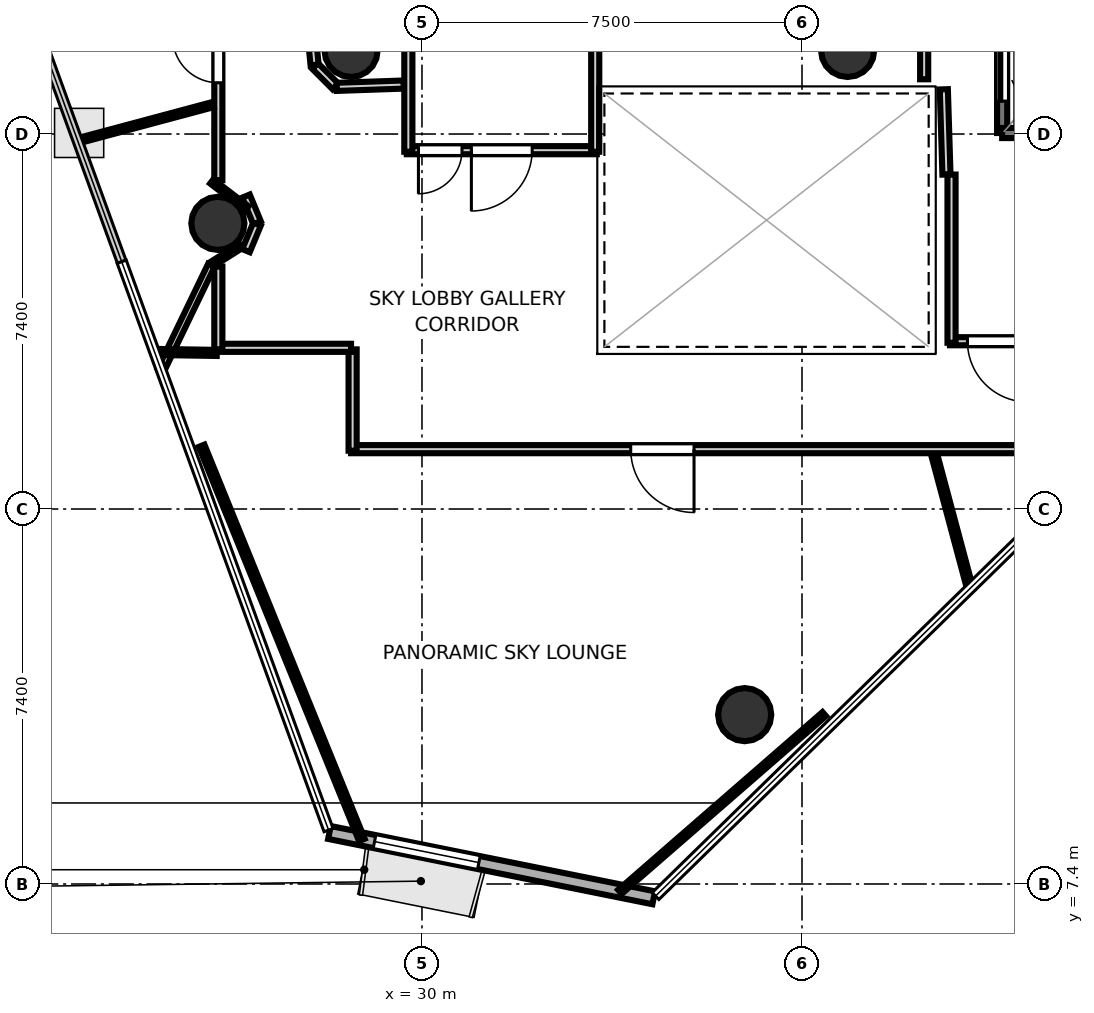
"""IFC4 building model, lengths in metres.
Left out: names, types, materials, properties, quantities, classifications, styles, units other than length and angle.
Written with IfcOpenShell. Run it as: python <this file> out.ifc"""

import sys

from ifc_helpers import new_model, si_unit, direction, frame, frame_2d, origin, origin_2d, place, context, subcontext, project, spatial, rectangle, hollow_circle, extrude, element, fill, save


model = new_model("IFC4")
c1 = context("Model", 3, precision=1e-05, world=origin(), true_north=direction((0.0, 1.0)))
c2 = subcontext(c1, "Body", "Model", "MODEL_VIEW")
j1 = project(units=[si_unit("LENGTHUNIT", "METRE"), si_unit("PLANEANGLEUNIT", "RADIAN")], contexts=[c1])
p1 = place(None, origin())
s1 = spatial("IfcSite", under=j1, at=p1, CompositionType="ELEMENT")
p2 = place(p1, origin())
s2 = spatial("IfcBuilding", under=s1, at=p2, CompositionType="ELEMENT")
p3 = place(p2, frame((0.0, 0.0, 234.5)))
s3 = spatial("IfcBuildingStorey", under=s2, at=p3, CompositionType="ELEMENT", Elevation=234.5)
for number, where, z_axis, x_axis in (
    (1, (28.6, 23.85, 0.0), (0.0, 0.0, 1.0), (1.0, 0.0, 0.0)),
    (2, (38.4, 23.85, 0.0), (0.0, 0.0, 1.0), (1.0, 0.0, 0.0)),
):
    element("IfcColumn", number, at=place(p3, frame(where, z_axis=z_axis, x_axis=x_axis)), inside=s3, PredefinedType="COLUMN", context=c2, shape_type="SweptSolid", body=[
        extrude(hollow_circle(Radius=0.525, WallThickness=0.028, at=origin_2d()), origin(), (0.0, 0.0, 1.0), 4.5),
    ])
for number, where, z_axis, x_axis in (
    (3, (25.972, 20.437, -0.27), (0.0, 0.0, 1.0), (1.0, 0.0, 0.0)),
    (4, (36.369, 10.742, -0.27), (0.0, 0.0, 1.0), (1.0, 0.0, 0.0)),
):
    element("IfcColumn", number, at=place(p3, frame(where, z_axis=z_axis, x_axis=x_axis)), inside=s3, PredefinedType="COLUMN", context=c2, shape_type="SweptSolid", body=[
        extrude(hollow_circle(Radius=0.525, WallThickness=0.028, at=origin_2d()), origin(), (0.0, 0.0, 1.0), 4.77),
    ])
p4 = place(p3, frame((28.173, 8.417, 0.0), z_axis=(0.0, 0.0, 1.0), x_axis=(0.980315150118, -0.197439120866, 0.0)))
e5 = element("IfcWall", 5, at=p4, inside=s3, PredefinedType="SOLIDWALL", context=c2, shape_type="SweptSolid", body=[
    extrude(rectangle(XDim=6.529, YDim=0.26, at=frame_2d((3.264, 0.0))), origin(), (0.0, 0.0, 1.0), 4.32),
])
p5 = place(p4, frame((0.909, 0.0, 0.85)))
e6 = element("IfcOpeningElement", 6, at=p5, cuts=e5, PredefinedType="OPENING", context=c2, shape_type="SweptSolid", body=[
    extrude(rectangle(XDim=2.1, YDim=2.2, at=frame_2d((1.05, 1.1))), frame((0.0, 0.14, 0.0), z_axis=(0.0, -1.0, 0.0), x_axis=(1.0, 0.0, 0.0)), (0.0, 0.0, 1.0), 0.28),
])
p6 = place(p3, frame((41.45, 22.22, 0.0), z_axis=(0.0, 0.0, 1.0), x_axis=(0.0, 1.0, 0.0)))
e7 = element("IfcWall", 7, at=p6, inside=s3, PredefinedType="SOLIDWALL", context=c2, shape_type="SweptSolid", body=[
    extrude(rectangle(XDim=2.36, YDim=0.2, at=frame_2d((1.18, 0.0))), origin(), (0.0, 0.0, 1.0), 4.32),
])
p7 = place(p6, frame((0.63, 0.0, 0.0)))
e8 = element("IfcOpeningElement", 8, at=p7, cuts=e7, PredefinedType="OPENING", context=c2, shape_type="SweptSolid", body=[
    extrude(rectangle(XDim=1.1, YDim=2.15, at=frame_2d((0.55, 1.075))), frame((0.0, 0.11, 0.0), z_axis=(0.0, -1.0, 0.0), x_axis=(1.0, 0.0, 0.0)), (0.0, 0.0, 1.0), 0.22),
])
p8 = place(p3, frame((41.45, 22.22, 0.0), z_axis=(0.0, 0.0, 1.0), x_axis=(1.0, 0.0, 0.0)))
e9 = element("IfcWall", 9, at=p8, inside=s3, PredefinedType="SOLIDWALL", context=c2, shape_type="SweptSolid", body=[
    extrude(rectangle(XDim=2.1, YDim=0.2, at=frame_2d((1.05, 0.0))), origin(), (0.0, 0.0, 1.0), 4.32),
])
p9 = place(p3, frame((33.45, 21.881, 0.0), z_axis=(0.0, 0.0, 1.0), x_axis=(-1.0, 0.0, 0.0)))
e10 = element("IfcWall", 10, at=p9, inside=s3, PredefinedType="PARTITIONING", context=c2, shape_type="SweptSolid", body=[
    extrude(rectangle(XDim=3.75, YDim=0.16, at=frame_2d((1.875, 0.0))), origin(), (0.0, 0.0, 1.0), 3.64),
])
p10 = place(p9, frame((1.275, 0.0, 0.0)))
e11 = element("IfcOpeningElement", 11, at=p10, cuts=e10, PredefinedType="OPENING", context=c2, shape_type="SweptSolid", body=[
    extrude(rectangle(XDim=1.2, YDim=2.15, at=frame_2d((0.6, 1.075))), frame((0.0, 0.09, 0.0), z_axis=(0.0, -1.0, 0.0), x_axis=(1.0, 0.0, 0.0)), (0.0, 0.0, 1.0), 0.18),
])
p11 = place(p9, frame((2.66, 0.0, 0.0)))
e12 = element("IfcOpeningElement", 12, at=p11, cuts=e10, PredefinedType="OPENING", context=c2, shape_type="SweptSolid", body=[
    extrude(rectangle(XDim=0.86, YDim=2.05, at=frame_2d((0.43, 1.025))), frame((0.0, 0.09, 0.0), z_axis=(0.0, -1.0, 0.0), x_axis=(1.0, 0.0, 0.0)), (0.0, 0.0, 1.0), 0.18),
])
for number, where, z_axis, x_axis in (
    (13, (29.731, 21.85, 0.0), (0.0, 0.0, 1.0), (0.0, 1.0, 0.0)),
    (14, (33.419, 24.542, 0.0), (0.0, 0.0, 1.0), (0.0, -1.0, 0.0)),
):
    element("IfcWall", number, at=place(p3, frame(where, z_axis=z_axis, x_axis=x_axis)), inside=s3, PredefinedType="PARTITIONING", context=c2, shape_type="SweptSolid", body=[
        extrude(rectangle(XDim=2.692, YDim=0.16, at=frame_2d((1.346, 0.0))), origin(), (0.0, 0.0, 1.0), 3.64),
    ])
p12 = place(p3, frame((40.351, 21.401, 0.0), z_axis=(0.0, 0.0, 1.0), x_axis=(-0.031058045979, 0.999517582527, 0.0)))
e15 = element("IfcWall", 15, at=p12, inside=s3, PredefinedType="PARTITIONING", context=c2, shape_type="SweptSolid", body=[
    extrude(rectangle(XDim=1.682, YDim=0.16, at=frame_2d((0.841, 0.0))), origin(), (0.0, 0.0, 1.0), 3.64),
])
p13 = place(p3, frame((39.911, 23.28, 0.0), z_axis=(0.0, 0.0, 1.0), x_axis=(0.0, 1.0, 0.0)))
e16 = element("IfcWall", 16, at=p13, inside=s3, PredefinedType="PARTITIONING", context=c2, shape_type="SweptSolid", body=[
    extrude(rectangle(XDim=1.48, YDim=0.16, at=frame_2d((0.74, 0.0))), origin(), (0.0, 0.0, 1.0), 3.64),
])
p14 = place(p3, frame((43.15, 18.111, 0.0), z_axis=(0.0, 0.0, 1.0), x_axis=(-1.0, 0.0, 0.0)))
e17 = element("IfcWall", 17, at=p14, inside=s3, PredefinedType="PARTITIONING", context=c2, shape_type="SweptSolid", body=[
    extrude(rectangle(XDim=2.73, YDim=0.16, at=frame_2d((1.365, 0.0))), origin(), (0.0, 0.0, 1.0), 3.64),
])
p15 = place(p14, frame((1.185, 0.0, 0.0)))
e18 = element("IfcOpeningElement", 18, at=p15, cuts=e17, PredefinedType="OPENING", context=c2, shape_type="SweptSolid", body=[
    extrude(rectangle(XDim=1.2, YDim=2.15, at=frame_2d((0.6, 1.075))), frame((0.0, 0.09, 0.0), z_axis=(0.0, -1.0, 0.0), x_axis=(1.0, 0.0, 0.0)), (0.0, 0.0, 1.0), 0.18),
])
p16 = place(p3, frame((40.451, 18.08, 0.0), z_axis=(0.0, 0.0, 1.0), x_axis=(0.0, 1.0, 0.0)))
e19 = element("IfcWall", 19, at=p16, inside=s3, PredefinedType="PARTITIONING", context=c2, shape_type="SweptSolid", body=[
    extrude(rectangle(XDim=3.32, YDim=0.16, at=frame_2d((1.66, 0.0))), origin(), (0.0, 0.0, 1.0), 3.64),
])
p17 = place(p3, frame((27.838, 23.992, 0.0), z_axis=(0.0, 0.0, 1.0), x_axis=(0.098273407977, -0.995159453196, 0.0)))
e20 = element("IfcWall", 20, at=p17, inside=s3, PredefinedType="PARTITIONING", context=c2, shape_type="SweptSolid", body=[
    extrude(rectangle(XDim=0.432, YDim=0.16, at=frame_2d((0.216, 0.0))), origin(), (0.0, 0.0, 1.0), 3.64),
])
p18 = place(p3, frame((27.89, 23.543, 0.0), z_axis=(0.0, 0.0, 1.0), x_axis=(0.707106781187, -0.707106781187, 0.0)))
e21 = element("IfcWall", 21, at=p18, inside=s3, PredefinedType="PARTITIONING", context=c2, shape_type="SweptSolid", body=[
    extrude(rectangle(XDim=0.57, YDim=0.16, at=frame_2d((0.285, 0.0))), origin(), (0.0, 0.0, 1.0), 3.64),
])
p19 = place(p3, frame((28.316, 23.131, 0.0), z_axis=(0.0, 0.0, 1.0), x_axis=(0.999405342193, 0.034481328227, 0.0)))
e22 = element("IfcWall", 22, at=p19, inside=s3, PredefinedType="PARTITIONING", context=c2, shape_type="SweptSolid", body=[
    extrude(rectangle(XDim=1.324, YDim=0.16, at=frame_2d((0.662, 0.0))), origin(), (0.0, 0.0, 1.0), 3.64),
])
p20 = place(p3, frame((43.65, 15.981, 0.0), z_axis=(0.0, 0.0, 1.0), x_axis=(-1.0, 0.0, 0.0)))
e23 = element("IfcWall", 23, at=p20, inside=s3, PredefinedType="PARTITIONING", context=c2, shape_type="SweptSolid", body=[
    extrude(rectangle(XDim=15.05, YDim=0.16, at=frame_2d((7.525, 0.0))), origin(), (0.0, 0.0, 1.0), 3.64),
])
p21 = place(p20, frame((8.28, 0.0, 0.0)))
e24 = element("IfcOpeningElement", 24, at=p21, cuts=e23, PredefinedType="OPENING", context=c2, shape_type="SweptSolid", body=[
    extrude(rectangle(XDim=1.25, YDim=2.2, at=frame_2d((0.625, 1.1))), frame((0.0, 0.09, 0.0), z_axis=(0.0, -1.0, 0.0), x_axis=(1.0, 0.0, 0.0)), (0.0, 0.0, 1.0), 0.18),
])
p22 = place(p3, frame((28.631, 15.95, 0.0), z_axis=(0.0, 0.0, 1.0), x_axis=(0.0, 1.0, 0.0)))
e25 = element("IfcWall", 25, at=p22, inside=s3, PredefinedType="PARTITIONING", context=c2, shape_type="SweptSolid", body=[
    extrude(rectangle(XDim=2.0, YDim=0.16, at=frame_2d((1.0, 0.0))), origin(), (0.0, 0.0, 1.0), 3.64),
])
p23 = place(p3, frame((28.6, 17.981, 0.0), z_axis=(0.0, 0.0, 1.0), x_axis=(-1.0, 0.0, 0.0)))
e26 = element("IfcWall", 26, at=p23, inside=s3, PredefinedType="PARTITIONING", context=c2, shape_type="SweptSolid", body=[
    extrude(rectangle(XDim=2.65, YDim=0.16, at=frame_2d((1.325, 0.0))), origin(), (0.0, 0.0, 1.0), 3.64),
])
p24 = place(p3, frame((25.981, 17.95, 0.0), z_axis=(0.0, 0.0, 1.0), x_axis=(0.0, 1.0, 0.0)))
e27 = element("IfcWall", 27, at=p24, inside=s3, PredefinedType="PARTITIONING", context=c2, shape_type="SweptSolid", body=[
    extrude(rectangle(XDim=1.635, YDim=0.16, at=frame_2d((0.817, 0.0))), origin(), (0.0, 0.0, 1.0), 3.64),
])
p25 = place(p3, frame((26.527, 19.898, 0.0), z_axis=(0.0, 0.0, 1.0), x_axis=(0.382729887879, 0.923860288639, 0.0)))
e28 = element("IfcWall", 28, at=p25, inside=s3, PredefinedType="PARTITIONING", context=c2, shape_type="SweptSolid", body=[
    extrude(rectangle(XDim=0.57, YDim=0.16, at=frame_2d((0.285, 0.0))), origin(), (0.0, 0.0, 1.0), 3.64),
])
p26 = place(p3, frame((26.746, 20.449, 0.0), z_axis=(0.0, 0.0, 1.0), x_axis=(-0.382881317414, 0.923797541009, 0.0)))
e29 = element("IfcWall", 29, at=p26, inside=s3, PredefinedType="PARTITIONING", context=c2, shape_type="SweptSolid", body=[
    extrude(rectangle(XDim=0.57, YDim=0.16, at=frame_2d((0.285, 0.0))), origin(), (0.0, 0.0, 1.0), 3.64),
])
p27 = place(p3, frame((25.981, 21.289, 0.0), z_axis=(0.0, 0.0, 1.0), x_axis=(0.0, 1.0, 0.0)))
e30 = element("IfcWall", 30, at=p27, inside=s3, PredefinedType="PARTITIONING", context=c2, shape_type="SweptSolid", body=[
    extrude(rectangle(XDim=3.824, YDim=0.16, at=frame_2d((1.912, 0.0))), origin(), (0.0, 0.0, 1.0), 3.64),
])
p28 = place(p27, frame((1.922, 0.0, 0.0)))
e31 = element("IfcOpeningElement", 31, at=p28, cuts=e30, PredefinedType="OPENING", context=c2, shape_type="SweptSolid", body=[
    extrude(rectangle(XDim=0.9, YDim=2.1, at=frame_2d((0.45, 1.05))), frame((0.0, 0.09, 0.0), z_axis=(0.0, -1.0, 0.0), x_axis=(1.0, 0.0, 0.0)), (0.0, 0.0, 1.0), 0.18),
])
p29 = place(p3, frame((25.851, 21.265, 0.0), z_axis=(0.0, 0.0, 1.0), x_axis=(0.793898208532, -0.608050684145, 0.0)))
e32 = element("IfcWall", 32, at=p29, inside=s3, PredefinedType="PARTITIONING", context=c2, shape_type="SweptSolid", body=[
    extrude(rectangle(XDim=0.875, YDim=0.105, at=frame_2d((0.438, 0.0))), origin(), (0.0, 0.0, 1.0), 3.64),
])
p30 = place(p3, frame((26.422, 19.991, 0.0), z_axis=(0.0, 0.0, 1.0), x_axis=(-0.84577514661, -0.533539503108, 0.0)))
e33 = element("IfcWall", 33, at=p30, inside=s3, PredefinedType="PARTITIONING", context=c2, shape_type="SweptSolid", body=[
    extrude(rectangle(XDim=0.668, YDim=0.105, at=frame_2d((0.334, 0.0))), origin(), (0.0, 0.0, 1.0), 3.64),
])
p31 = place(p3, frame((25.842, 19.608, 0.0), z_axis=(0.0, 0.0, 1.0), x_axis=(-0.434265140705, -0.900785095108, 0.0)))
e34 = element("IfcWall", 34, at=p31, inside=s3, PredefinedType="PARTITIONING", context=c2, shape_type="SweptSolid", body=[
    extrude(rectangle(XDim=2.286, YDim=0.14, at=frame_2d((1.143, 0.0))), origin(), (0.0, 0.0, 1.0), 3.64),
])
p32 = place(p3, frame((24.702, 17.9, 0.0), z_axis=(0.0, 0.0, 1.0), x_axis=(0.999871423276, -0.016035489284, 0.0)))
e35 = element("IfcWall", 35, at=p32, inside=s3, PredefinedType="PARTITIONING", context=c2, shape_type="SweptSolid", body=[
    extrude(rectangle(XDim=1.249, YDim=0.12, at=frame_2d((0.624, 0.0))), origin(), (0.0, 0.0, 1.0), 3.64),
])
p33 = place(p3, frame((40.112, 15.862, 0.0), z_axis=(0.0, 0.0, 1.0), x_axis=(0.258853210166, -0.96591667114, 0.0)))
e36 = element("IfcWall", 36, at=p33, inside=s3, PredefinedType="PARTITIONING", context=c2, shape_type="SweptSolid", body=[
    extrude(rectangle(XDim=2.744, YDim=0.12, at=frame_2d((1.372, 0.0))), origin(), (0.0, 0.0, 1.0), 3.64),
])
p34 = place(p3, frame((37.939, 10.753, 0.0), z_axis=(0.0, 0.0, 1.0), x_axis=(-0.754503242289, -0.656296318271, 0.0)))
e37 = element("IfcWall", 37, at=p34, inside=s3, PredefinedType="PARTITIONING", context=c2, shape_type="SweptSolid", body=[
    extrude(rectangle(XDim=5.345, YDim=0.105, at=frame_2d((2.672, 0.0))), origin(), (0.0, 0.0, 1.0), 3.64),
])
p35 = place(p3, frame((28.813, 8.27, 0.0), z_axis=(0.0, 0.0, 1.0), x_axis=(-0.376573581052, 0.926386710858, 0.0)))
e38 = element("IfcWall", 38, at=p35, inside=s3, PredefinedType="PARTITIONING", context=c2, shape_type="SweptSolid", body=[
    extrude(rectangle(XDim=8.396, YDim=0.12, at=frame_2d((4.198, 0.0))), origin(), (0.0, 0.0, 1.0), 3.64),
])
p36 = place(p3, frame((23.186, 22.06, 0.0), z_axis=(0.0, 0.0, 1.0), x_axis=(0.965928889301, 0.258807613514, 0.0)))
e39 = element("IfcWall", 39, at=p36, inside=s3, PredefinedType="PARTITIONING", context=c2, shape_type="SweptSolid", body=[
    extrude(rectangle(XDim=2.787, YDim=0.105, at=frame_2d((1.393, 0.0))), origin(), (0.0, 0.0, 1.0), 3.64),
])
p37 = place(p7, origin())
e40 = element("IfcDoor", 40, at=p37, inside=s3, OperationType="SLIDING_TO_LEFT", PredefinedType="DOOR", context=c2, shape_type="SweptSolid", body=[
    extrude(rectangle(XDim=1.1, YDim=2.15, at=frame_2d((0.55, 1.075))), frame((0.0, 0.025, 0.0), z_axis=(0.0, -1.0, 0.0), x_axis=(1.0, 0.0, 0.0)), (0.0, 0.0, 1.0), 0.05),
])
fill(e8, e40)
p38 = place(p10, origin())
e41 = element("IfcDoor", 41, at=p38, inside=s3, OperationType="SINGLE_SWING_RIGHT", PredefinedType="DOOR", context=c2, shape_type="SweptSolid", body=[
    extrude(rectangle(XDim=1.2, YDim=2.15, at=frame_2d((0.6, 1.075))), frame((0.0, 0.025, 0.0), z_axis=(0.0, -1.0, 0.0), x_axis=(1.0, 0.0, 0.0)), (0.0, 0.0, 1.0), 0.05),
])
fill(e11, e41)
p39 = place(p15, origin())
e42 = element("IfcDoor", 42, at=p39, inside=s3, OperationType="SINGLE_SWING_LEFT", PredefinedType="DOOR", context=c2, shape_type="SweptSolid", body=[
    extrude(rectangle(XDim=1.2, YDim=2.15, at=frame_2d((0.6, 1.075))), frame((0.0, 0.025, 0.0), z_axis=(0.0, -1.0, 0.0), x_axis=(1.0, 0.0, 0.0)), (0.0, 0.0, 1.0), 0.05),
])
fill(e18, e42)
p40 = place(p11, origin())
e43 = element("IfcDoor", 43, at=p40, inside=s3, OperationType="SINGLE_SWING_RIGHT", PredefinedType="DOOR", context=c2, shape_type="SweptSolid", body=[
    extrude(rectangle(XDim=0.86, YDim=2.05, at=frame_2d((0.43, 1.025))), frame((0.0, 0.025, 0.0), z_axis=(0.0, -1.0, 0.0), x_axis=(1.0, 0.0, 0.0)), (0.0, 0.0, 1.0), 0.05),
])
fill(e12, e43)
p41 = place(p21, origin())
e44 = element("IfcDoor", 44, at=p41, inside=s3, OperationType="SINGLE_SWING_LEFT", PredefinedType="DOOR", context=c2, shape_type="SweptSolid", body=[
    extrude(rectangle(XDim=1.25, YDim=2.2, at=frame_2d((0.625, 1.1))), frame((0.0, 0.025, 0.0), z_axis=(0.0, -1.0, 0.0), x_axis=(1.0, 0.0, 0.0)), (0.0, 0.0, 1.0), 0.05),
])
fill(e24, e44)
p42 = place(p28, origin())
e45 = element("IfcDoor", 45, at=p42, inside=s3, OperationType="SINGLE_SWING_RIGHT", PredefinedType="DOOR", context=c2, shape_type="SweptSolid", body=[
    extrude(rectangle(XDim=0.9, YDim=2.1, at=frame_2d((0.45, 1.05))), frame((0.0, 0.025, 0.0), z_axis=(0.0, -1.0, 0.0), x_axis=(1.0, 0.0, 0.0)), (0.0, 0.0, 1.0), 0.05),
])
fill(e31, e45)
p43 = place(p5, origin())
e46 = element("IfcWindow", 46, at=p43, inside=s3, PartitioningType="SINGLE_PANEL", PredefinedType="WINDOW", context=c2, shape_type="SweptSolid", body=[
    extrude(rectangle(XDim=2.1, YDim=2.2, at=frame_2d((1.05, 1.1))), frame((0.0, 0.03, 0.0), z_axis=(0.0, -1.0, 0.0), x_axis=(1.0, 0.0, 0.0)), (0.0, 0.0, 1.0), 0.06),
])
fill(e6, e46)
save(model, sys.argv[1])
